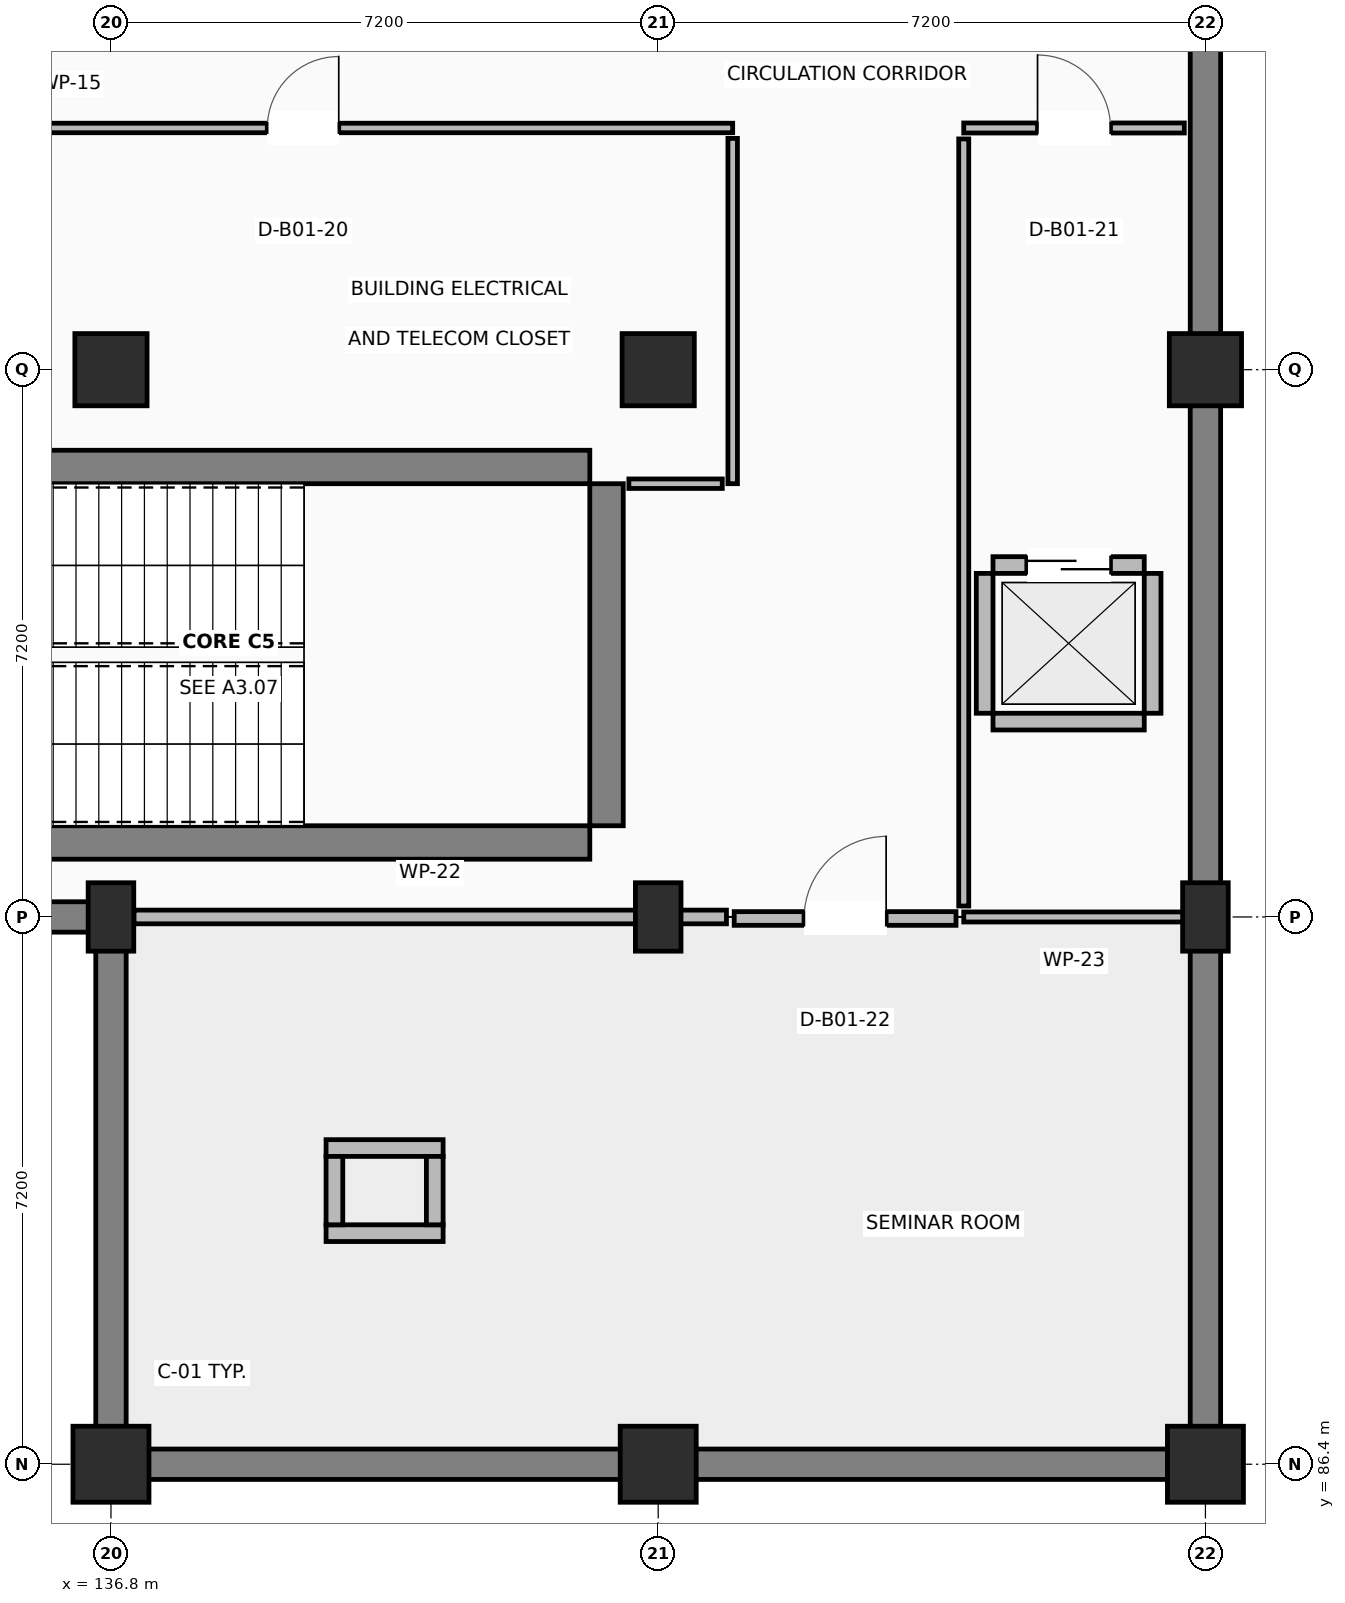
"""IFC4 building model, lengths in metres.
Left out: names, types, materials, properties, quantities, classifications, styles, units other than length and angle.
Written with IfcOpenShell. Run it as: python <this file> out.ifc"""

import sys

from ifc_helpers import new_model, si_unit, direction, frame, frame_2d, origin, origin_2d, place, context, subcontext, project, spatial, rectangle, extrude, element, fill, save


model = new_model("IFC4")
c1 = context("Model", 3, precision=1e-05, world=origin(), true_north=direction((0.0, 1.0)))
c2 = subcontext(c1, "Body", "Model", "MODEL_VIEW")
j1 = project(units=[si_unit("LENGTHUNIT", "METRE"), si_unit("PLANEANGLEUNIT", "RADIAN")], contexts=[c1])
p1 = place(None, origin())
s1 = spatial("IfcSite", under=j1, at=p1, CompositionType="ELEMENT")
p2 = place(p1, origin())
s2 = spatial("IfcBuilding", under=s1, at=p2, CompositionType="ELEMENT")
p3 = place(p2, frame((0.0, 0.0, -4.5)))
s3 = spatial("IfcBuildingStorey", under=s2, at=p3, CompositionType="ELEMENT", Elevation=-4.5)
p4 = place(p3, frame((136.8, 86.4, 0.0), z_axis=(0.0, 0.0, 1.0), x_axis=(1.0, 0.0, 0.0)))
e1 = element("IfcColumn", 1, at=p4, inside=s3, PredefinedType="COLUMN", context=c2, shape_type="SweptSolid", body=[
    extrude(rectangle(XDim=1.0, YDim=1.0, at=origin_2d()), origin(), (0.0, 0.0, 1.0), 4.15),
])
p5 = place(p3, frame((136.8, 93.6, 0.0), z_axis=(0.0, 0.0, 1.0), x_axis=(1.0, 0.0, 0.0)))
e2 = element("IfcColumn", 2, at=p5, inside=s3, PredefinedType="COLUMN", context=c2, shape_type="SweptSolid", body=[
    extrude(rectangle(XDim=0.6, YDim=0.9, at=origin_2d()), origin(), (0.0, 0.0, 1.0), 4.15),
])
p6 = place(p3, frame((136.8, 100.8, 0.0), z_axis=(0.0, 0.0, 1.0), x_axis=(1.0, 0.0, 0.0)))
e3 = element("IfcColumn", 3, at=p6, inside=s3, PredefinedType="COLUMN", context=c2, shape_type="SweptSolid", body=[
    extrude(rectangle(XDim=0.95, YDim=0.95, at=origin_2d()), origin(), (0.0, 0.0, 1.0), 4.15),
])
p7 = place(p3, frame((144.0, 86.4, 0.0), z_axis=(0.0, 0.0, 1.0), x_axis=(1.0, 0.0, 0.0)))
e4 = element("IfcColumn", 4, at=p7, inside=s3, PredefinedType="COLUMN", context=c2, shape_type="SweptSolid", body=[
    extrude(rectangle(XDim=1.0, YDim=1.0, at=origin_2d()), origin(), (0.0, 0.0, 1.0), 4.15),
])
p8 = place(p3, frame((144.0, 93.6, 0.0), z_axis=(0.0, 0.0, 1.0), x_axis=(1.0, 0.0, 0.0)))
e5 = element("IfcColumn", 5, at=p8, inside=s3, PredefinedType="COLUMN", context=c2, shape_type="SweptSolid", body=[
    extrude(rectangle(XDim=0.6, YDim=0.9, at=origin_2d()), origin(), (0.0, 0.0, 1.0), 4.15),
])
p9 = place(p3, frame((144.0, 100.8, 0.0), z_axis=(0.0, 0.0, 1.0), x_axis=(1.0, 0.0, 0.0)))
e6 = element("IfcColumn", 6, at=p9, inside=s3, PredefinedType="COLUMN", context=c2, shape_type="SweptSolid", body=[
    extrude(rectangle(XDim=0.95, YDim=0.95, at=origin_2d()), origin(), (0.0, 0.0, 1.0), 4.15),
])
p10 = place(p3, frame((151.2, 86.4, 0.0), z_axis=(0.0, 0.0, 1.0), x_axis=(1.0, 0.0, 0.0)))
e7 = element("IfcColumn", 7, at=p10, inside=s3, PredefinedType="COLUMN", context=c2, shape_type="SweptSolid", body=[
    extrude(rectangle(XDim=1.0, YDim=1.0, at=origin_2d()), origin(), (0.0, 0.0, 1.0), 4.15),
])
p11 = place(p3, frame((151.2, 93.6, 0.0), z_axis=(0.0, 0.0, 1.0), x_axis=(1.0, 0.0, 0.0)))
e8 = element("IfcColumn", 8, at=p11, inside=s3, PredefinedType="COLUMN", context=c2, shape_type="SweptSolid", body=[
    extrude(rectangle(XDim=0.6, YDim=0.9, at=origin_2d()), origin(), (0.0, 0.0, 1.0), 4.15),
])
p12 = place(p3, frame((151.2, 100.8, 0.0), z_axis=(0.0, 0.0, 1.0), x_axis=(1.0, 0.0, 0.0)))
e9 = element("IfcColumn", 9, at=p12, inside=s3, PredefinedType="COLUMN", context=c2, shape_type="SweptSolid", body=[
    extrude(rectangle(XDim=0.95, YDim=0.95, at=origin_2d()), origin(), (0.0, 0.0, 1.0), 4.15),
])
p13 = place(p3, frame((151.2, 115.2, 0.0), z_axis=(0.0, 0.0, 1.0), x_axis=(0.0, -1.0, 0.0)))
e10 = element("IfcWall", 10, at=p13, inside=s3, PredefinedType="SOLIDWALL", context=c2, shape_type="SweptSolid", body=[
    extrude(rectangle(XDim=28.8, YDim=0.4, at=frame_2d((14.4, 0.0))), origin(), (0.0, 0.0, 1.0), 4.15),
])
p14 = place(p3, frame((151.2, 86.4, 0.0), z_axis=(0.0, 0.0, 1.0), x_axis=(-1.0, 0.0, 0.0)))
e11 = element("IfcWall", 11, at=p14, inside=s3, PredefinedType="SOLIDWALL", context=c2, shape_type="SweptSolid", body=[
    extrude(rectangle(XDim=14.4, YDim=0.4, at=frame_2d((7.2, 0.0))), origin(), (0.0, 0.0, 1.0), 4.15),
])
p15 = place(p3, frame((136.8, 86.4, 0.0), z_axis=(0.0, 0.0, 1.0), x_axis=(0.0, 1.0, 0.0)))
e12 = element("IfcWall", 12, at=p15, inside=s3, PredefinedType="SOLIDWALL", context=c2, shape_type="SweptSolid", body=[
    extrude(rectangle(XDim=7.2, YDim=0.4, at=frame_2d((3.6, 0.0))), origin(), (0.0, 0.0, 1.0), 4.15),
])
p16 = place(p3, frame((136.8, 93.6, 0.0), z_axis=(0.0, 0.0, 1.0), x_axis=(-1.0, 0.0, 0.0)))
e13 = element("IfcWall", 13, at=p16, inside=s3, PredefinedType="SOLIDWALL", context=c2, shape_type="SweptSolid", body=[
    extrude(rectangle(XDim=79.2, YDim=0.4, at=frame_2d((39.6, 0.0))), origin(), (0.0, 0.0, 1.0), 4.15),
])
for number, where, z_axis, x_axis in (
    (14, (133.6, 94.58, 0.0), (0.0, 0.0, 1.0), (1.0, 0.0, 0.0)),
    (15, (133.6, 99.52, 0.0), (0.0, 0.0, 1.0), (1.0, 0.0, 0.0)),
):
    element("IfcWall", number, at=place(p3, frame(where, z_axis=z_axis, x_axis=x_axis)), inside=s3, PredefinedType="SHEAR", context=c2, shape_type="SweptSolid", body=[
        extrude(rectangle(XDim=9.5, YDim=0.44, at=frame_2d((4.75, 0.0))), origin(), (0.0, 0.0, 1.0), 4.15),
    ])
p17 = place(p3, frame((143.32, 94.8, 0.0), z_axis=(0.0, 0.0, 1.0), x_axis=(0.0, 1.0, 0.0)))
e16 = element("IfcWall", 16, at=p17, inside=s3, PredefinedType="SHEAR", context=c2, shape_type="SweptSolid", body=[
    extrude(rectangle(XDim=4.5, YDim=0.44, at=frame_2d((2.25, 0.0))), origin(), (0.0, 0.0, 1.0), 4.15),
])
p18 = place(p3, frame((148.405, 96.17, 0.0), z_axis=(0.0, 0.0, 1.0), x_axis=(1.0, 0.0, 0.0)))
e17 = element("IfcWall", 17, at=p18, inside=s3, PredefinedType="STANDARD", context=c2, shape_type="SweptSolid", body=[
    extrude(rectangle(XDim=1.99, YDim=0.22, at=frame_2d((0.995, 0.0))), origin(), (0.0, 0.0, 1.0), 3.19),
])
p19 = place(p3, frame((148.405, 98.23, 0.0), z_axis=(0.0, 0.0, 1.0), x_axis=(1.0, 0.0, 0.0)))
e18 = element("IfcWall", 18, at=p19, inside=s3, PredefinedType="STANDARD", context=c2, shape_type="SweptSolid", body=[
    extrude(rectangle(XDim=1.99, YDim=0.22, at=frame_2d((0.995, 0.0))), origin(), (0.0, 0.0, 1.0), 3.19),
])
p20 = place(p19, frame((0.445, 0.0, 0.0)))
e19 = element("IfcOpeningElement", 19, at=p20, cuts=e18, PredefinedType="OPENING", context=c2, shape_type="SweptSolid", body=[
    extrude(rectangle(XDim=1.1, YDim=2.15, at=frame_2d((0.55, 1.075))), frame((0.0, 0.12, 0.0), z_axis=(0.0, -1.0, 0.0), x_axis=(1.0, 0.0, 0.0)), (0.0, 0.0, 1.0), 0.24),
])
for number, where, z_axis, x_axis in (
    (20, (148.295, 96.28, 0.0), (0.0, 0.0, 1.0), (0.0, 1.0, 0.0)),
    (21, (150.505, 96.28, 0.0), (0.0, 0.0, 1.0), (0.0, 1.0, 0.0)),
):
    element("IfcWall", number, at=place(p3, frame(where, z_axis=z_axis, x_axis=x_axis)), inside=s3, PredefinedType="STANDARD", context=c2, shape_type="SweptSolid", body=[
        extrude(rectangle(XDim=1.84, YDim=0.22, at=frame_2d((0.92, 0.0))), origin(), (0.0, 0.0, 1.0), 3.19),
    ])
for number, where, z_axis, x_axis in (
    (22, (139.63, 89.44, 0.0), (0.0, 0.0, 1.0), (1.0, 0.0, 0.0)),
    (23, (139.63, 90.56, 0.0), (0.0, 0.0, 1.0), (1.0, 0.0, 0.0)),
):
    element("IfcWall", number, at=place(p3, frame(where, z_axis=z_axis, x_axis=x_axis)), inside=s3, PredefinedType="STANDARD", context=c2, shape_type="SweptSolid", body=[
        extrude(rectangle(XDim=1.54, YDim=0.22, at=frame_2d((0.77, 0.0))), origin(), (0.0, 0.0, 1.0), 3.19),
    ])
for number, where, z_axis, x_axis in (
    (24, (139.74, 89.55, 0.0), (0.0, 0.0, 1.0), (0.0, 1.0, 0.0)),
    (25, (141.06, 89.55, 0.0), (0.0, 0.0, 1.0), (0.0, 1.0, 0.0)),
):
    element("IfcWall", number, at=place(p3, frame(where, z_axis=z_axis, x_axis=x_axis)), inside=s3, PredefinedType="STANDARD", context=c2, shape_type="SweptSolid", body=[
        extrude(rectangle(XDim=0.9, YDim=0.22, at=frame_2d((0.45, 0.0))), origin(), (0.0, 0.0, 1.0), 3.19),
    ])
p21 = place(p3, frame((133.674, 103.98, 0.0), z_axis=(0.0, 0.0, 1.0), x_axis=(1.0, 0.0, 0.0)))
e26 = element("IfcWall", 26, at=p21, inside=s3, PredefinedType="PARTITIONING", context=c2, shape_type="SweptSolid", body=[
    extrude(rectangle(XDim=11.306, YDim=0.125, at=frame_2d((5.653, 0.0))), origin(), (0.0, 0.0, 1.0), 3.19),
])
p22 = place(p21, frame((5.183, 0.0, 0.0)))
e27 = element("IfcOpeningElement", 27, at=p22, cuts=e26, PredefinedType="OPENING", context=c2, shape_type="SweptSolid", body=[
    extrude(rectangle(XDim=0.94, YDim=2.1, at=frame_2d((0.47, 1.05))), frame((0.0, 0.073, 0.0), z_axis=(0.0, -1.0, 0.0), x_axis=(1.0, 0.0, 0.0)), (0.0, 0.0, 1.0), 0.145),
])
p23 = place(p3, frame((144.98, 103.843, 0.0), z_axis=(0.0, 0.0, 1.0), x_axis=(0.0, -1.0, 0.0)))
e28 = element("IfcWall", 28, at=p23, inside=s3, PredefinedType="PARTITIONING", context=c2, shape_type="SweptSolid", body=[
    extrude(rectangle(XDim=4.543, YDim=0.125, at=frame_2d((2.271, 0.0))), origin(), (0.0, 0.0, 1.0), 3.19),
])
p24 = place(p3, frame((144.843, 99.3, 0.0), z_axis=(0.0, 0.0, 1.0), x_axis=(-1.0, 0.0, 0.0)))
e29 = element("IfcWall", 29, at=p24, inside=s3, PredefinedType="PARTITIONING", context=c2, shape_type="SweptSolid", body=[
    extrude(rectangle(XDim=1.229, YDim=0.125, at=frame_2d((0.615, 0.0))), origin(), (0.0, 0.0, 1.0), 3.19),
])
p25 = place(p3, frame((148.02, 103.98, 0.0), z_axis=(0.0, 0.0, 1.0), x_axis=(1.0, 0.0, 0.0)))
e30 = element("IfcWall", 30, at=p25, inside=s3, PredefinedType="PARTITIONING", context=c2, shape_type="SweptSolid", body=[
    extrude(rectangle(XDim=2.902, YDim=0.132, at=frame_2d((1.451, 0.0))), origin(), (0.0, 0.0, 1.0), 3.19),
])
p26 = place(p25, frame((0.971, 0.0, 0.0)))
e31 = element("IfcOpeningElement", 31, at=p26, cuts=e30, PredefinedType="OPENING", context=c2, shape_type="SweptSolid", body=[
    extrude(rectangle(XDim=0.96, YDim=2.1, at=frame_2d((0.48, 1.05))), frame((0.0, 0.076, 0.0), z_axis=(0.0, -1.0, 0.0), x_axis=(1.0, 0.0, 0.0)), (0.0, 0.0, 1.0), 0.152),
])
p27 = place(p3, frame((150.922, 93.6, 0.0), z_axis=(0.0, 0.0, 1.0), x_axis=(-1.0, 0.0, 0.0)))
e32 = element("IfcWall", 32, at=p27, inside=s3, PredefinedType="PARTITIONING", context=c2, shape_type="SweptSolid", body=[
    extrude(rectangle(XDim=2.902, YDim=0.132, at=frame_2d((1.451, 0.0))), origin(), (0.0, 0.0, 1.0), 3.19),
])
p28 = place(p3, frame((148.02, 93.744, 0.0), z_axis=(0.0, 0.0, 1.0), x_axis=(0.0, 1.0, 0.0)))
e33 = element("IfcWall", 33, at=p28, inside=s3, PredefinedType="PARTITIONING", context=c2, shape_type="SweptSolid", body=[
    extrude(rectangle(XDim=10.092, YDim=0.132, at=frame_2d((5.046, 0.0))), origin(), (0.0, 0.0, 1.0), 3.19),
])
p29 = place(p3, frame((145.0, 93.58, 0.0), z_axis=(0.0, 0.0, 1.0), x_axis=(1.0, 0.0, 0.0)))
e34 = element("IfcWall", 34, at=p29, inside=s3, PredefinedType="PARTITIONING", context=c2, shape_type="SweptSolid", body=[
    extrude(rectangle(XDim=2.918, YDim=0.18, at=frame_2d((1.459, 0.0))), origin(), (0.0, 0.0, 1.0), 3.19),
])
p30 = place(p29, frame((0.919, 0.0, 0.0)))
e35 = element("IfcOpeningElement", 35, at=p30, cuts=e34, PredefinedType="OPENING", context=c2, shape_type="SweptSolid", body=[
    extrude(rectangle(XDim=1.08, YDim=2.15, at=frame_2d((0.54, 1.075))), frame((0.0, 0.1, 0.0), z_axis=(0.0, -1.0, 0.0), x_axis=(1.0, 0.0, 0.0)), (0.0, 0.0, 1.0), 0.2),
])
p31 = place(p3, frame((137.102, 93.6, 0.0), z_axis=(0.0, 0.0, 1.0), x_axis=(1.0, 0.0, 0.0)))
e36 = element("IfcWall", 36, at=p31, inside=s3, PredefinedType="PARTITIONING", context=c2, shape_type="SweptSolid", body=[
    extrude(rectangle(XDim=7.796, YDim=0.18, at=frame_2d((3.898, 0.0))), origin(), (0.0, 0.0, 1.0), 3.19),
])
p32 = place(p20, origin())
e37 = element("IfcDoor", 37, at=p32, inside=s3, OperationType="SLIDING_TO_RIGHT", PredefinedType="DOOR", context=c2, shape_type="SweptSolid", body=[
    extrude(rectangle(XDim=1.1, YDim=2.15, at=frame_2d((0.55, 1.075))), frame((0.0, 0.025, 0.0), z_axis=(0.0, -1.0, 0.0), x_axis=(1.0, 0.0, 0.0)), (0.0, 0.0, 1.0), 0.05),
])
fill(e19, e37)
p33 = place(p22, origin())
e38 = element("IfcDoor", 38, at=p33, inside=s3, OperationType="SINGLE_SWING_RIGHT", PredefinedType="DOOR", context=c2, shape_type="SweptSolid", body=[
    extrude(rectangle(XDim=0.94, YDim=2.1, at=frame_2d((0.47, 1.05))), frame((0.0, 0.025, 0.0), z_axis=(0.0, -1.0, 0.0), x_axis=(1.0, 0.0, 0.0)), (0.0, 0.0, 1.0), 0.05),
])
fill(e27, e38)
p34 = place(p26, origin())
e39 = element("IfcDoor", 39, at=p34, inside=s3, OperationType="SINGLE_SWING_LEFT", PredefinedType="DOOR", context=c2, shape_type="SweptSolid", body=[
    extrude(rectangle(XDim=0.96, YDim=2.1, at=frame_2d((0.48, 1.05))), frame((0.0, 0.025, 0.0), z_axis=(0.0, -1.0, 0.0), x_axis=(1.0, 0.0, 0.0)), (0.0, 0.0, 1.0), 0.05),
])
fill(e31, e39)
p35 = place(p30, origin())
e40 = element("IfcDoor", 40, at=p35, inside=s3, OperationType="SINGLE_SWING_RIGHT", PredefinedType="DOOR", context=c2, shape_type="SweptSolid", body=[
    extrude(rectangle(XDim=1.08, YDim=2.15, at=frame_2d((0.54, 1.075))), frame((0.0, 0.025, 0.0), z_axis=(0.0, -1.0, 0.0), x_axis=(1.0, 0.0, 0.0)), (0.0, 0.0, 1.0), 0.05),
])
fill(e35, e40)
save(model, sys.argv[1])
